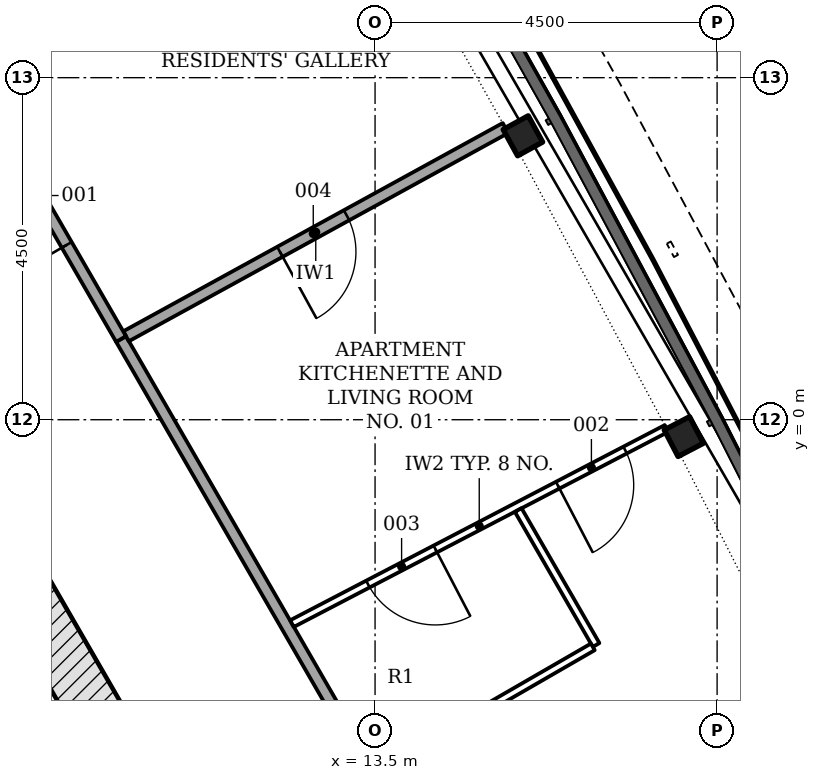
"""IFC4 building model, lengths in metres.
Left out: names, types, materials, properties, quantities, classifications, styles, units other than length and angle.
Written with IfcOpenShell. Run it as: python <this file> out.ifc"""

import sys

from ifc_helpers import new_model, si_unit, direction, frame, frame_2d, origin, origin_2d, place, context, subcontext, project, spatial, rectangle, i_section, extrude, element, fill, save


model = new_model("IFC4")
c1 = context("Model", 3, precision=1e-05, world=origin(), true_north=direction((0.0, 1.0)))
c2 = subcontext(c1, "Body", "Model", "MODEL_VIEW")
j1 = project(units=[si_unit("LENGTHUNIT", "METRE"), si_unit("PLANEANGLEUNIT", "RADIAN")], contexts=[c1])
p1 = place(None, origin())
s1 = spatial("IfcSite", under=j1, at=p1, CompositionType="ELEMENT")
p2 = place(p1, origin())
s2 = spatial("IfcBuilding", under=s1, at=p2, CompositionType="ELEMENT")
p3 = place(p2, frame((0.0, 0.0, 192.3)))
s3 = spatial("IfcBuildingStorey", under=s2, at=p3, CompositionType="ELEMENT", Elevation=192.3)
p4 = place(p3, frame((10.311, -4.703, -0.2), z_axis=(0.0, 0.0, 1.0), x_axis=(-0.500001446645, 0.866024568562, 0.0)))
e1 = element("IfcWall", 1, at=p4, inside=s3, PredefinedType="SHEAR", context=c2, shape_type="SweptSolid", body=[
    extrude(rectangle(XDim=18.458, YDim=0.7, at=frame_2d((9.229, 0.0))), origin(), (0.0, 0.0, 1.0), 3.6),
])
p5 = place(p4, frame((4.379, 0.0, 0.2)))
e2 = element("IfcOpeningElement", 2, at=p5, cuts=e1, PredefinedType="OPENING", context=c2, shape_type="SweptSolid", body=[
    extrude(rectangle(XDim=1.1, YDim=2.1, at=frame_2d((0.55, 1.05))), frame((0.0, 0.36, 0.0), z_axis=(0.0, -1.0, 0.0), x_axis=(1.0, 0.0, 0.0)), (0.0, 0.0, 1.0), 0.72),
])
p6 = place(p4, frame((6.529, 0.0, 0.2)))
e3 = element("IfcOpeningElement", 3, at=p6, cuts=e1, PredefinedType="OPENING", context=c2, shape_type="SweptSolid", body=[
    extrude(rectangle(XDim=1.1, YDim=2.1, at=frame_2d((0.55, 1.05))), frame((0.0, 0.36, 0.0), z_axis=(0.0, -1.0, 0.0), x_axis=(1.0, 0.0, 0.0)), (0.0, 0.0, 1.0), 0.72),
])
p7 = place(p4, frame((8.679, 0.0, 0.2)))
e4 = element("IfcOpeningElement", 4, at=p7, cuts=e1, PredefinedType="OPENING", context=c2, shape_type="SweptSolid", body=[
    extrude(rectangle(XDim=1.1, YDim=2.1, at=frame_2d((0.55, 1.05))), frame((0.0, 0.36, 0.0), z_axis=(0.0, -1.0, 0.0), x_axis=(1.0, 0.0, 0.0)), (0.0, 0.0, 1.0), 0.72),
])
p8 = place(p4, frame((10.829, 0.0, 0.2)))
e5 = element("IfcOpeningElement", 5, at=p8, cuts=e1, PredefinedType="OPENING", context=c2, shape_type="SweptSolid", body=[
    extrude(rectangle(XDim=1.1, YDim=2.1, at=frame_2d((0.55, 1.05))), frame((0.0, 0.36, 0.0), z_axis=(0.0, -1.0, 0.0), x_axis=(1.0, 0.0, 0.0)), (0.0, 0.0, 1.0), 0.72),
])
p9 = place(p4, frame((12.979, 0.0, 0.2)))
e6 = element("IfcOpeningElement", 6, at=p9, cuts=e1, PredefinedType="OPENING", context=c2, shape_type="SweptSolid", body=[
    extrude(rectangle(XDim=1.1, YDim=2.1, at=frame_2d((0.55, 1.05))), frame((0.0, 0.36, 0.0), z_axis=(0.0, -1.0, 0.0), x_axis=(1.0, 0.0, 0.0)), (0.0, 0.0, 1.0), 0.72),
])
for number, where, z_axis, x_axis in (
    (7, (17.562, -0.222, -0.2), (0.0, 0.0, 1.0), (-0.462, 0.887, 0.0)),
    (8, (15.445, 3.735, -0.2), (0.0, 0.0, 1.0), (-0.481, 0.877, 0.0)),
):
    element("IfcColumn", number, at=place(p3, frame(where, z_axis=z_axis, x_axis=x_axis)), inside=s3, PredefinedType="COLUMN", context=c2, shape_type="SweptSolid", body=[
        extrude(i_section(OverallWidth=0.394, OverallDepth=0.376, WebThickness=0.017, FlangeThickness=0.028, FilletRadius=0.015, at=origin_2d()), origin(), (0.0, 0.0, 1.0), 3.6),
    ])
p10 = place(p3, frame((15.807, -8.722, 0.0), z_axis=(0.0, 0.0, 1.0), x_axis=(-0.500004300164, 0.866022921069, 0.0)))
e9 = element("IfcWall", 9, at=p10, inside=s3, PredefinedType="PARTITIONING", context=c2, shape_type="SweptSolid", body=[
    extrude(rectangle(XDim=11.297, YDim=0.15, at=frame_2d((5.649, 0.0))), origin(), (0.0, 0.0, 1.0), 2.852),
])
p11 = place(p3, frame((15.216, 3.837, 0.0), z_axis=(0.0, 0.0, 1.0), x_axis=(-0.876645576733, -0.48113670905, 0.0)))
e10 = element("IfcWall", 10, at=p11, inside=s3, PredefinedType="PARTITIONING", context=c2, shape_type="SweptSolid", body=[
    extrude(rectangle(XDim=5.694, YDim=0.15, at=frame_2d((2.847, 0.0))), origin(), (0.0, 0.0, 1.0), 3.4),
])
p12 = place(p11, frame((2.385, 0.0, 0.0)))
e11 = element("IfcOpeningElement", 11, at=p12, cuts=e10, PredefinedType="OPENING", context=c2, shape_type="SweptSolid", body=[
    extrude(rectangle(XDim=1.0, YDim=2.1, at=frame_2d((0.5, 1.05))), frame((0.0, 0.085, 0.0), z_axis=(0.0, -1.0, 0.0), x_axis=(1.0, 0.0, 0.0)), (0.0, 0.0, 1.0), 0.17),
])
p13 = place(p3, frame((13.012, 7.743, 0.0), z_axis=(0.0, 0.0, 1.0), x_axis=(-0.866026840724, -0.499997511139, 0.0)))
e12 = element("IfcWall", 12, at=p13, inside=s3, PredefinedType="PARTITIONING", context=c2, shape_type="SweptSolid", body=[
    extrude(rectangle(XDim=5.737, YDim=0.15, at=frame_2d((2.868, 0.0))), origin(), (0.0, 0.0, 1.0), 3.4),
])
p14 = place(p13, frame((0.706, 0.0, 0.0)))
e13 = element("IfcOpeningElement", 13, at=p14, cuts=e12, PredefinedType="OPENING", context=c2, shape_type="SweptSolid", body=[
    extrude(rectangle(XDim=1.0, YDim=2.1, at=frame_2d((0.5, 1.05))), frame((0.0, 0.085, 0.0), z_axis=(0.0, -1.0, 0.0), x_axis=(1.0, 0.0, 0.0)), (0.0, 0.0, 1.0), 0.17),
])
p15 = place(p3, frame((10.158, 1.062, 0.0), z_axis=(0.0, 0.0, 1.0), x_axis=(-0.499969679245, 0.866042908773, 0.0)))
e14 = element("IfcWall", 14, at=p15, inside=s3, PredefinedType="PARTITIONING", context=c2, shape_type="SweptSolid", body=[
    extrude(rectangle(XDim=4.36, YDim=0.15, at=frame_2d((2.18, 0.0))), origin(), (0.0, 0.0, 1.0), 2.852),
])
p16 = place(p15, frame((1.43, 0.0, 0.0)))
e15 = element("IfcOpeningElement", 15, at=p16, cuts=e14, PredefinedType="OPENING", context=c2, shape_type="SweptSolid", body=[
    extrude(rectangle(XDim=1.5, YDim=2.1, at=frame_2d((0.75, 1.05))), frame((0.0, 0.085, 0.0), z_axis=(0.0, -1.0, 0.0), x_axis=(1.0, 0.0, 0.0)), (0.0, 0.0, 1.0), 0.17),
])
p17 = place(p3, frame((17.334, -0.115, 0.0), z_axis=(0.0, 0.0, 1.0), x_axis=(-0.886851071155, -0.462055383684, 0.0)))
e16 = element("IfcWall", 16, at=p17, inside=s3, PredefinedType="PARTITIONING", context=c2, shape_type="SweptSolid", body=[
    extrude(rectangle(XDim=5.556, YDim=0.1, at=frame_2d((2.778, 0.0))), origin(), (0.0, 0.0, 1.0), 3.4),
])
p18 = place(p17, frame((0.614, 0.0, 0.0)))
e17 = element("IfcOpeningElement", 17, at=p18, cuts=e16, PredefinedType="OPENING", context=c2, shape_type="SweptSolid", body=[
    extrude(rectangle(XDim=1.0, YDim=2.1, at=frame_2d((0.5, 1.05))), frame((0.0, 0.06, 0.0), z_axis=(0.0, -1.0, 0.0), x_axis=(1.0, 0.0, 0.0)), (0.0, 0.0, 1.0), 0.12),
])
p19 = place(p17, frame((3.43, 0.0, 0.0)))
e18 = element("IfcOpeningElement", 18, at=p19, cuts=e16, PredefinedType="OPENING", context=c2, shape_type="SweptSolid", body=[
    extrude(rectangle(XDim=1.0, YDim=2.1, at=frame_2d((0.5, 1.05))), frame((0.0, 0.06, 0.0), z_axis=(0.0, -1.0, 0.0), x_axis=(1.0, 0.0, 0.0)), (0.0, 0.0, 1.0), 0.12),
])
p20 = place(p3, frame((15.383, -1.188, 0.0), z_axis=(0.0, 0.0, 1.0), x_axis=(0.500007699544, -0.866020958405, 0.0)))
e19 = element("IfcWall", 19, at=p20, inside=s3, PredefinedType="PARTITIONING", context=c2, shape_type="SweptSolid", body=[
    extrude(rectangle(XDim=2.05, YDim=0.1, at=frame_2d((1.025, 0.0))), origin(), (0.0, 0.0, 1.0), 2.852),
])
p21 = place(p3, frame((16.365, -2.989, 0.0), z_axis=(0.0, 0.0, 1.0), x_axis=(-0.866027924134, -0.499995634601, 0.0)))
e20 = element("IfcWall", 20, at=p21, inside=s3, PredefinedType="PARTITIONING", context=c2, shape_type="SweptSolid", body=[
    extrude(rectangle(XDim=3.275, YDim=0.1, at=frame_2d((1.637, 0.0))), origin(), (0.0, 0.0, 1.0), 3.4),
])
p22 = place(p16, origin())
e21 = element("IfcDoor", 21, at=p22, inside=s3, OperationType="DOUBLE_DOOR_SINGLE_SWING", PredefinedType="DOOR", context=c2, shape_type="SweptSolid", body=[
    extrude(rectangle(XDim=1.5, YDim=2.1, at=frame_2d((0.75, 1.05))), frame((0.0, 0.025, 0.0), z_axis=(0.0, -1.0, 0.0), x_axis=(1.0, 0.0, 0.0)), (0.0, 0.0, 1.0), 0.05),
])
fill(e15, e21)
p23 = place(p18, origin())
e22 = element("IfcDoor", 22, at=p23, inside=s3, OperationType="SINGLE_SWING_RIGHT", PredefinedType="DOOR", context=c2, shape_type="SweptSolid", body=[
    extrude(rectangle(XDim=1.0, YDim=2.1, at=frame_2d((0.5, 1.05))), frame((0.0, 0.025, 0.0), z_axis=(0.0, -1.0, 0.0), x_axis=(1.0, 0.0, 0.0)), (0.0, 0.0, 1.0), 0.05),
])
fill(e17, e22)
p24 = place(p19, origin())
e23 = element("IfcDoor", 23, at=p24, inside=s3, OperationType="SINGLE_SWING_LEFT", PredefinedType="DOOR", context=c2, shape_type="SweptSolid", body=[
    extrude(rectangle(XDim=1.0, YDim=2.1, at=frame_2d((0.5, 1.05))), frame((0.0, 0.025, 0.0), z_axis=(0.0, -1.0, 0.0), x_axis=(1.0, 0.0, 0.0)), (0.0, 0.0, 1.0), 0.05),
])
fill(e18, e23)
p25 = place(p12, origin())
e24 = element("IfcDoor", 24, at=p25, inside=s3, OperationType="SINGLE_SWING_RIGHT", PredefinedType="DOOR", context=c2, shape_type="SweptSolid", body=[
    extrude(rectangle(XDim=1.0, YDim=2.1, at=frame_2d((0.5, 1.05))), frame((0.0, 0.025, 0.0), z_axis=(0.0, -1.0, 0.0), x_axis=(1.0, 0.0, 0.0)), (0.0, 0.0, 1.0), 0.05),
])
fill(e11, e24)
save(model, sys.argv[1])
